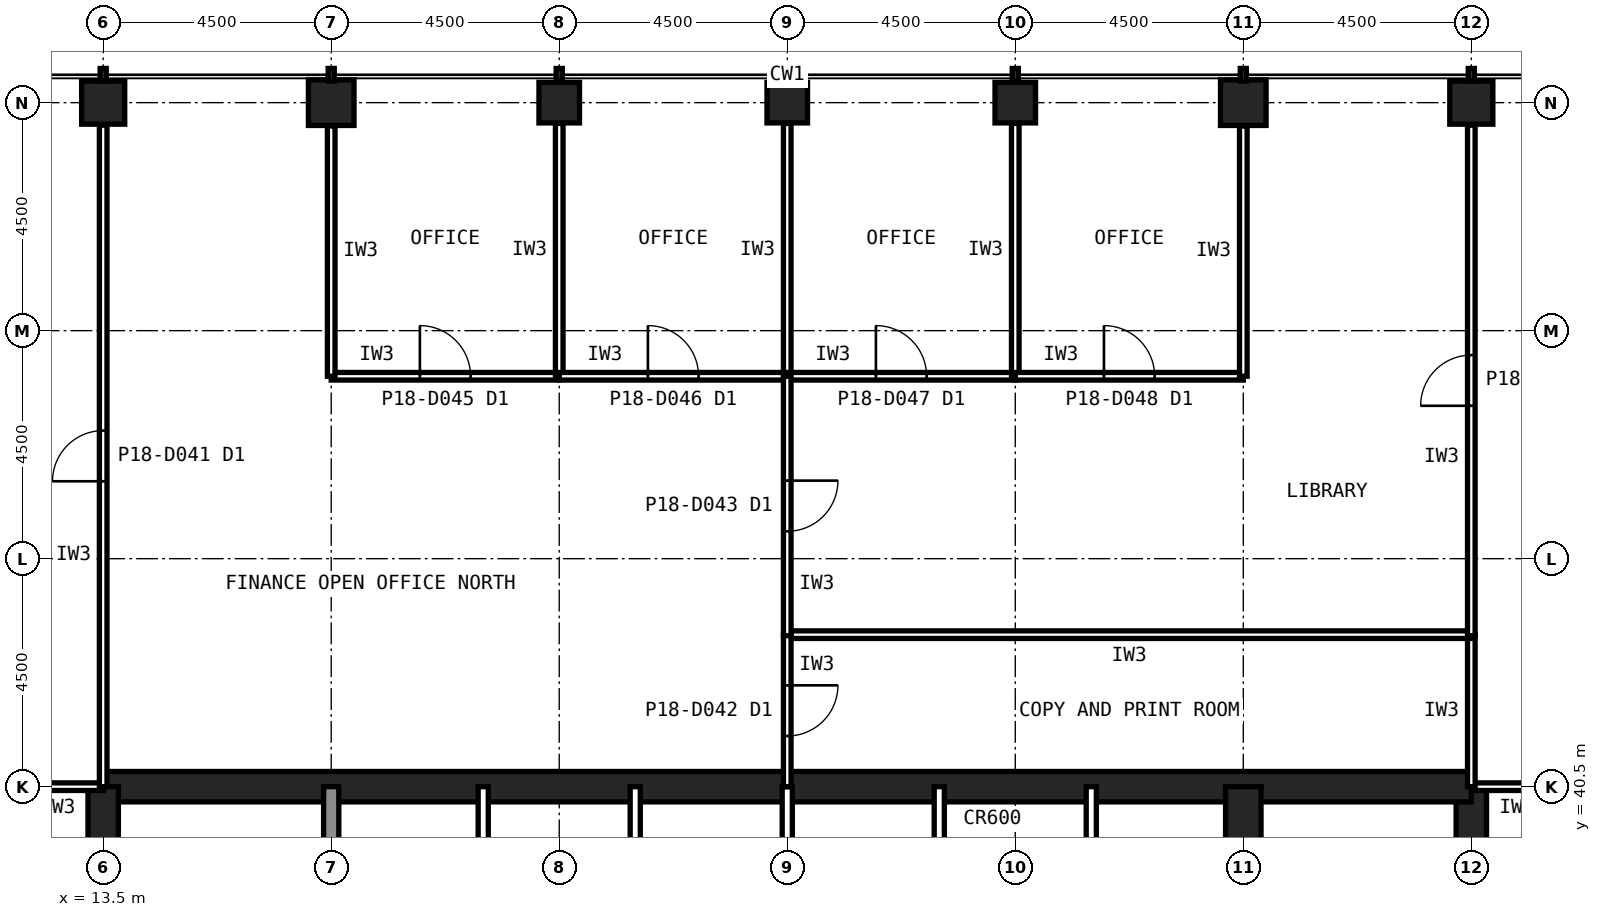
"""IFC4 building model, lengths in metres.
Left out: names, types, materials, properties, quantities, classifications, styles, units other than length and angle.
Written with IfcOpenShell. Run it as: python <this file> out.ifc"""

import sys

from ifc_helpers import new_model, si_unit, direction, frame, frame_2d, origin, origin_2d, place, context, subcontext, project, spatial, rectangle, hollow_rectangle, extrude, element, fill, save


model = new_model("IFC4")
c1 = context("Model", 3, precision=1e-05, world=origin(), true_north=direction((0.0, 1.0)))
c2 = subcontext(c1, "Body", "Model", "MODEL_VIEW")
j1 = project(units=[si_unit("LENGTHUNIT", "METRE"), si_unit("PLANEANGLEUNIT", "RADIAN")], contexts=[c1])
p1 = place(None, origin())
s1 = spatial("IfcSite", under=j1, at=p1, CompositionType="ELEMENT")
p2 = place(p1, origin())
s2 = spatial("IfcBuilding", under=s1, at=p2, CompositionType="ELEMENT")
p3 = place(p2, frame((0.0, 0.0, 79.4)))
s3 = spatial("IfcBuildingStorey", under=s2, at=p3, CompositionType="ELEMENT", Elevation=79.4)
p4 = place(p3, frame((40.5, 54.0, 0.0), z_axis=(0.0, 0.0, 1.0), x_axis=(1.0, 0.0, 0.0)))
e1 = element("IfcColumn", 1, at=p4, inside=s3, PredefinedType="COLUMN", context=c2, shape_type="SweptSolid", body=[
    extrude(hollow_rectangle(XDim=0.85, YDim=0.85, WallThickness=0.05, at=origin_2d()), origin(), (0.0, 0.0, 1.0), 4.2),
])
p5 = place(p3, frame((36.0, 54.0, 0.0), z_axis=(0.0, 0.0, 1.0), x_axis=(1.0, 0.0, 0.0)))
e2 = element("IfcColumn", 2, at=p5, inside=s3, PredefinedType="COLUMN", context=c2, shape_type="SweptSolid", body=[
    extrude(hollow_rectangle(XDim=0.9, YDim=0.9, WallThickness=0.063, at=origin_2d()), origin(), (0.0, 0.0, 1.0), 4.2),
])
for number, where, z_axis, x_axis in (
    (3, (31.5, 54.0, 0.0), (0.0, 0.0, 1.0), (1.0, 0.0, 0.0)),
    (4, (27.0, 54.0, 0.0), (0.0, 0.0, 1.0), (1.0, 0.0, 0.0)),
    (5, (22.5, 54.0, 0.0), (0.0, 0.0, 1.0), (1.0, 0.0, 0.0)),
):
    element("IfcColumn", number, at=place(p3, frame(where, z_axis=z_axis, x_axis=x_axis)), inside=s3, PredefinedType="COLUMN", context=c2, shape_type="SweptSolid", body=[
        extrude(hollow_rectangle(XDim=0.8, YDim=0.8, WallThickness=0.045, at=origin_2d()), origin(), (0.0, 0.0, 1.0), 4.2),
    ])
p6 = place(p3, frame((18.0, 54.0, 0.0), z_axis=(0.0, 0.0, 1.0), x_axis=(1.0, 0.0, 0.0)))
e6 = element("IfcColumn", 6, at=p6, inside=s3, PredefinedType="COLUMN", context=c2, shape_type="SweptSolid", body=[
    extrude(hollow_rectangle(XDim=0.9, YDim=0.9, WallThickness=0.063, at=origin_2d()), origin(), (0.0, 0.0, 1.0), 4.2),
])
p7 = place(p3, frame((13.5, 54.0, 0.0), z_axis=(0.0, 0.0, 1.0), x_axis=(1.0, 0.0, 0.0)))
e7 = element("IfcColumn", 7, at=p7, inside=s3, PredefinedType="COLUMN", context=c2, shape_type="SweptSolid", body=[
    extrude(hollow_rectangle(XDim=0.85, YDim=0.85, WallThickness=0.05, at=origin_2d()), origin(), (0.0, 0.0, 1.0), 4.2),
])
p8 = place(p3, frame((40.5, 13.5, 0.0), z_axis=(0.0, 0.0, 1.0), x_axis=(0.0, 1.0, 0.0)))
e8 = element("IfcWall", 8, at=p8, inside=s3, PredefinedType="SHEAR", context=c2, shape_type="SweptSolid", body=[
    extrude(rectangle(XDim=27.0, YDim=0.6, at=frame_2d((13.5, 0.0))), origin(), (0.0, 0.0, 1.0), 4.2),
])
p9 = place(p8, frame((5.85, 0.0, 0.0)))
e9 = element("IfcOpeningElement", 9, at=p9, cuts=e8, PredefinedType="OPENING", context=c2, shape_type="SweptSolid", body=[
    extrude(rectangle(XDim=1.8, YDim=2.1, at=frame_2d((0.9, 1.05))), frame((0.0, 0.31, 0.0), z_axis=(0.0, -1.0, 0.0), x_axis=(1.0, 0.0, 0.0)), (0.0, 0.0, 1.0), 0.62),
])
p10 = place(p8, frame((19.65, 0.0, 0.0)))
e10 = element("IfcOpeningElement", 10, at=p10, cuts=e8, PredefinedType="OPENING", context=c2, shape_type="SweptSolid", body=[
    extrude(rectangle(XDim=1.2, YDim=2.1, at=frame_2d((0.6, 1.05))), frame((0.0, 0.31, 0.0), z_axis=(0.0, -1.0, 0.0), x_axis=(1.0, 0.0, 0.0)), (0.0, 0.0, 1.0), 0.62),
])
p11 = place(p3, frame((40.5, 40.5, 0.0), z_axis=(0.0, 0.0, 1.0), x_axis=(-1.0, 0.0, 0.0)))
e11 = element("IfcWall", 11, at=p11, inside=s3, PredefinedType="SHEAR", context=c2, shape_type="SweptSolid", body=[
    extrude(rectangle(XDim=27.0, YDim=0.6, at=frame_2d((13.5, 0.0))), origin(), (0.0, 0.0, 1.0), 4.2),
])
p12 = place(p3, frame((13.5, 40.5, 0.0), z_axis=(0.0, 0.0, 1.0), x_axis=(0.0, -1.0, 0.0)))
e12 = element("IfcWall", 12, at=p12, inside=s3, PredefinedType="SHEAR", context=c2, shape_type="SweptSolid", body=[
    extrude(rectangle(XDim=27.0, YDim=0.6, at=frame_2d((13.5, 0.0))), origin(), (0.0, 0.0, 1.0), 4.2),
])
p13 = place(p12, frame((19.65, 0.0, 0.0)))
e13 = element("IfcOpeningElement", 13, at=p13, cuts=e12, PredefinedType="OPENING", context=c2, shape_type="SweptSolid", body=[
    extrude(rectangle(XDim=1.2, YDim=2.1, at=frame_2d((0.6, 1.05))), frame((0.0, 0.31, 0.0), z_axis=(0.0, -1.0, 0.0), x_axis=(1.0, 0.0, 0.0)), (0.0, 0.0, 1.0), 0.62),
])
p14 = place(p12, frame((5.85, 0.0, 0.0)))
e14 = element("IfcOpeningElement", 14, at=p14, cuts=e12, PredefinedType="OPENING", context=c2, shape_type="SweptSolid", body=[
    extrude(rectangle(XDim=1.8, YDim=2.1, at=frame_2d((0.9, 1.05))), frame((0.0, 0.31, 0.0), z_axis=(0.0, -1.0, 0.0), x_axis=(1.0, 0.0, 0.0)), (0.0, 0.0, 1.0), 0.62),
])
p15 = place(p3, frame((18.0, 36.0, 0.0), z_axis=(0.0, 0.0, 1.0), x_axis=(0.0, 1.0, 0.0)))
e15 = element("IfcWall", 15, at=p15, inside=s3, PredefinedType="SOLIDWALL", context=c2, shape_type="SweptSolid", body=[
    extrude(rectangle(XDim=4.5, YDim=0.3, at=frame_2d((2.25, 0.0))), origin(), (0.0, 0.0, 1.0), 4.04),
])
p16 = place(p3, frame((36.0, 22.5, 0.0), z_axis=(0.0, 0.0, 1.0), x_axis=(0.0, 1.0, 0.0)))
e16 = element("IfcWall", 16, at=p16, inside=s3, PredefinedType="SHEAR", context=c2, shape_type="SweptSolid", body=[
    extrude(rectangle(XDim=18.0, YDim=0.7, at=frame_2d((9.0, 0.0))), origin(), (0.0, 0.0, 1.0), 4.2),
])
for number, where, z_axis, x_axis in (
    (17, (21.0, 36.0, 0.0), (0.0, 0.0, 1.0), (0.0, 1.0, 0.0)),
    (18, (24.0, 36.0, 0.0), (0.0, 0.0, 1.0), (0.0, 1.0, 0.0)),
    (19, (27.0, 36.0, 0.0), (0.0, 0.0, 1.0), (0.0, 1.0, 0.0)),
    (20, (30.0, 36.0, 0.0), (0.0, 0.0, 1.0), (0.0, 1.0, 0.0)),
    (21, (33.0, 36.0, 0.0), (0.0, 0.0, 1.0), (0.0, 1.0, 0.0)),
):
    element("IfcWall", number, at=place(p3, frame(where, z_axis=z_axis, x_axis=x_axis)), inside=s3, PredefinedType="PARTITIONING", context=c2, shape_type="SweptSolid", body=[
        extrude(rectangle(XDim=4.5, YDim=0.2, at=frame_2d((2.25, 0.0))), origin(), (0.0, 0.0, 1.0), 4.04),
    ])
p17 = place(p3, frame((13.51, 40.5, 0.0), z_axis=(0.0, 0.0, 1.0), x_axis=(-1.0, 0.0, 0.0)))
e22 = element("IfcWall", 22, at=p17, inside=s3, PredefinedType="PARTITIONING", context=c2, shape_type="SweptSolid", body=[
    extrude(rectangle(XDim=1.81, YDim=0.15, at=frame_2d((0.905, 0.0))), origin(), (0.0, 0.0, 1.0), 3.189),
])
p18 = place(p3, frame((42.3, 40.5, 0.0), z_axis=(0.0, 0.0, 1.0), x_axis=(-1.0, 0.0, 0.0)))
e23 = element("IfcWall", 23, at=p18, inside=s3, PredefinedType="PARTITIONING", context=c2, shape_type="SweptSolid", body=[
    extrude(rectangle(XDim=1.8, YDim=0.15, at=frame_2d((0.9, 0.0))), origin(), (0.0, 0.0, 1.0), 3.189),
])
p19 = place(p3, frame((18.0, 48.6, 0.0), z_axis=(0.0, 0.0, 1.0), x_axis=(1.0, 0.0, 0.0)))
e24 = element("IfcWall", 24, at=p19, inside=s3, PredefinedType="PARTITIONING", context=c2, shape_type="SweptSolid", body=[
    extrude(rectangle(XDim=4.5, YDim=0.15, at=frame_2d((2.25, 0.0))), origin(), (0.0, 0.0, 1.0), 4.04),
])
p20 = place(p19, frame((1.75, 0.0, 0.0)))
e25 = element("IfcOpeningElement", 25, at=p20, cuts=e24, PredefinedType="OPENING", context=c2, shape_type="SweptSolid", body=[
    extrude(rectangle(XDim=1.0, YDim=2.1, at=frame_2d((0.5, 1.05))), frame((0.0, 0.085, 0.0), z_axis=(0.0, -1.0, 0.0), x_axis=(1.0, 0.0, 0.0)), (0.0, 0.0, 1.0), 0.17),
])
p21 = place(p3, frame((22.5, 48.6, 0.0), z_axis=(0.0, 0.0, 1.0), x_axis=(0.0, 1.0, 0.0)))
e26 = element("IfcWall", 26, at=p21, inside=s3, PredefinedType="PARTITIONING", context=c2, shape_type="SweptSolid", body=[
    extrude(rectangle(XDim=4.99, YDim=0.15, at=frame_2d((2.495, 0.0))), origin(), (0.0, 0.0, 1.0), 3.189),
])
p22 = place(p3, frame((18.0, 53.54, 0.0), z_axis=(0.0, 0.0, 1.0), x_axis=(0.0, -1.0, 0.0)))
e27 = element("IfcWall", 27, at=p22, inside=s3, PredefinedType="PARTITIONING", context=c2, shape_type="SweptSolid", body=[
    extrude(rectangle(XDim=4.94, YDim=0.15, at=frame_2d((2.47, 0.0))), origin(), (0.0, 0.0, 1.0), 3.189),
])
p23 = place(p3, frame((22.5, 48.6, 0.0), z_axis=(0.0, 0.0, 1.0), x_axis=(1.0, 0.0, 0.0)))
e28 = element("IfcWall", 28, at=p23, inside=s3, PredefinedType="PARTITIONING", context=c2, shape_type="SweptSolid", body=[
    extrude(rectangle(XDim=4.5, YDim=0.15, at=frame_2d((2.25, 0.0))), origin(), (0.0, 0.0, 1.0), 4.04),
])
p24 = place(p23, frame((1.75, 0.0, 0.0)))
e29 = element("IfcOpeningElement", 29, at=p24, cuts=e28, PredefinedType="OPENING", context=c2, shape_type="SweptSolid", body=[
    extrude(rectangle(XDim=1.0, YDim=2.1, at=frame_2d((0.5, 1.05))), frame((0.0, 0.085, 0.0), z_axis=(0.0, -1.0, 0.0), x_axis=(1.0, 0.0, 0.0)), (0.0, 0.0, 1.0), 0.17),
])
p25 = place(p3, frame((27.0, 48.6, 0.0), z_axis=(0.0, 0.0, 1.0), x_axis=(0.0, 1.0, 0.0)))
e30 = element("IfcWall", 30, at=p25, inside=s3, PredefinedType="PARTITIONING", context=c2, shape_type="SweptSolid", body=[
    extrude(rectangle(XDim=4.99, YDim=0.15, at=frame_2d((2.495, 0.0))), origin(), (0.0, 0.0, 1.0), 3.189),
])
p26 = place(p3, frame((27.0, 48.6, 0.0), z_axis=(0.0, 0.0, 1.0), x_axis=(1.0, 0.0, 0.0)))
e31 = element("IfcWall", 31, at=p26, inside=s3, PredefinedType="PARTITIONING", context=c2, shape_type="SweptSolid", body=[
    extrude(rectangle(XDim=4.5, YDim=0.15, at=frame_2d((2.25, 0.0))), origin(), (0.0, 0.0, 1.0), 4.04),
])
p27 = place(p26, frame((1.75, 0.0, 0.0)))
e32 = element("IfcOpeningElement", 32, at=p27, cuts=e31, PredefinedType="OPENING", context=c2, shape_type="SweptSolid", body=[
    extrude(rectangle(XDim=1.0, YDim=2.1, at=frame_2d((0.5, 1.05))), frame((0.0, 0.085, 0.0), z_axis=(0.0, -1.0, 0.0), x_axis=(1.0, 0.0, 0.0)), (0.0, 0.0, 1.0), 0.17),
])
p28 = place(p3, frame((31.5, 48.6, 0.0), z_axis=(0.0, 0.0, 1.0), x_axis=(0.0, 1.0, 0.0)))
e33 = element("IfcWall", 33, at=p28, inside=s3, PredefinedType="PARTITIONING", context=c2, shape_type="SweptSolid", body=[
    extrude(rectangle(XDim=4.99, YDim=0.15, at=frame_2d((2.495, 0.0))), origin(), (0.0, 0.0, 1.0), 3.189),
])
p29 = place(p3, frame((31.5, 48.6, 0.0), z_axis=(0.0, 0.0, 1.0), x_axis=(1.0, 0.0, 0.0)))
e34 = element("IfcWall", 34, at=p29, inside=s3, PredefinedType="PARTITIONING", context=c2, shape_type="SweptSolid", body=[
    extrude(rectangle(XDim=4.5, YDim=0.15, at=frame_2d((2.25, 0.0))), origin(), (0.0, 0.0, 1.0), 4.04),
])
p30 = place(p29, frame((1.75, 0.0, 0.0)))
e35 = element("IfcOpeningElement", 35, at=p30, cuts=e34, PredefinedType="OPENING", context=c2, shape_type="SweptSolid", body=[
    extrude(rectangle(XDim=1.0, YDim=2.1, at=frame_2d((0.5, 1.05))), frame((0.0, 0.085, 0.0), z_axis=(0.0, -1.0, 0.0), x_axis=(1.0, 0.0, 0.0)), (0.0, 0.0, 1.0), 0.17),
])
p31 = place(p3, frame((36.0, 48.6, 0.0), z_axis=(0.0, 0.0, 1.0), x_axis=(0.0, 1.0, 0.0)))
e36 = element("IfcWall", 36, at=p31, inside=s3, PredefinedType="PARTITIONING", context=c2, shape_type="SweptSolid", body=[
    extrude(rectangle(XDim=4.94, YDim=0.15, at=frame_2d((2.47, 0.0))), origin(), (0.0, 0.0, 1.0), 3.189),
])
p32 = place(p3, frame((40.5, 40.5, 0.0), z_axis=(0.0, 0.0, 1.0), x_axis=(0.0, 1.0, 0.0)))
e37 = element("IfcWall", 37, at=p32, inside=s3, PredefinedType="PARTITIONING", context=c2, shape_type="SweptSolid", body=[
    extrude(rectangle(XDim=3.0, YDim=0.15, at=frame_2d((1.5, 0.0))), origin(), (0.0, 0.0, 1.0), 3.189),
])
p33 = place(p3, frame((40.5, 43.5, 0.0), z_axis=(0.0, 0.0, 1.0), x_axis=(-1.0, 0.0, 0.0)))
e38 = element("IfcWall", 38, at=p33, inside=s3, PredefinedType="PARTITIONING", context=c2, shape_type="SweptSolid", body=[
    extrude(rectangle(XDim=13.5, YDim=0.15, at=frame_2d((6.75, 0.0))), origin(), (0.0, 0.0, 1.0), 4.04),
])
p34 = place(p3, frame((27.0, 43.5, 0.0), z_axis=(0.0, 0.0, 1.0), x_axis=(0.0, -1.0, 0.0)))
e39 = element("IfcWall", 39, at=p34, inside=s3, PredefinedType="PARTITIONING", context=c2, shape_type="SweptSolid", body=[
    extrude(rectangle(XDim=3.0, YDim=0.15, at=frame_2d((1.5, 0.0))), origin(), (0.0, 0.0, 1.0), 3.189),
])
p35 = place(p34, frame((1.0, 0.0, 0.0)))
e40 = element("IfcOpeningElement", 40, at=p35, cuts=e39, PredefinedType="OPENING", context=c2, shape_type="SweptSolid", body=[
    extrude(rectangle(XDim=1.0, YDim=2.1, at=frame_2d((0.5, 1.05))), frame((0.0, 0.085, 0.0), z_axis=(0.0, -1.0, 0.0), x_axis=(1.0, 0.0, 0.0)), (0.0, 0.0, 1.0), 0.17),
])
p36 = place(p3, frame((13.5, 40.5, 0.0), z_axis=(0.0, 0.0, 1.0), x_axis=(0.0, 1.0, 0.0)))
e41 = element("IfcWall", 41, at=p36, inside=s3, PredefinedType="PARTITIONING", context=c2, shape_type="SweptSolid", body=[
    extrude(rectangle(XDim=13.055, YDim=0.15, at=frame_2d((6.527, 0.0))), origin(), (0.0, 0.0, 1.0), 3.189),
])
p37 = place(p36, frame((6.028, 0.0, 0.0)))
e42 = element("IfcOpeningElement", 42, at=p37, cuts=e41, PredefinedType="OPENING", context=c2, shape_type="SweptSolid", body=[
    extrude(rectangle(XDim=1.0, YDim=2.1, at=frame_2d((0.5, 1.05))), frame((0.0, 0.085, 0.0), z_axis=(0.0, -1.0, 0.0), x_axis=(1.0, 0.0, 0.0)), (0.0, 0.0, 1.0), 0.17),
])
p38 = place(p3, frame((27.0, 48.6, 0.0), z_axis=(0.0, 0.0, 1.0), x_axis=(0.0, -1.0, 0.0)))
e43 = element("IfcWall", 43, at=p38, inside=s3, PredefinedType="PARTITIONING", context=c2, shape_type="SweptSolid", body=[
    extrude(rectangle(XDim=5.12, YDim=0.15, at=frame_2d((2.56, 0.0))), origin(), (0.0, 0.0, 1.0), 3.189),
])
p39 = place(p38, frame((2.06, 0.0, 0.0)))
e44 = element("IfcOpeningElement", 44, at=p39, cuts=e43, PredefinedType="OPENING", context=c2, shape_type="SweptSolid", body=[
    extrude(rectangle(XDim=1.0, YDim=2.1, at=frame_2d((0.5, 1.05))), frame((0.0, 0.085, 0.0), z_axis=(0.0, -1.0, 0.0), x_axis=(1.0, 0.0, 0.0)), (0.0, 0.0, 1.0), 0.17),
])
p40 = place(p3, frame((40.5, 43.48, 0.0), z_axis=(0.0, 0.0, 1.0), x_axis=(0.0, 1.0, 0.0)))
e45 = element("IfcWall", 45, at=p40, inside=s3, PredefinedType="PARTITIONING", context=c2, shape_type="SweptSolid", body=[
    extrude(rectangle(XDim=10.075, YDim=0.15, at=frame_2d((5.038, 0.0))), origin(), (0.0, 0.0, 1.0), 3.189),
])
p41 = place(p40, frame((4.538, 0.0, 0.0)))
e46 = element("IfcOpeningElement", 46, at=p41, cuts=e45, PredefinedType="OPENING", context=c2, shape_type="SweptSolid", body=[
    extrude(rectangle(XDim=1.0, YDim=2.1, at=frame_2d((0.5, 1.05))), frame((0.0, 0.085, 0.0), z_axis=(0.0, -1.0, 0.0), x_axis=(1.0, 0.0, 0.0)), (0.0, 0.0, 1.0), 0.17),
])
p42 = place(p20, origin())
e47 = element("IfcDoor", 47, at=p42, inside=s3, OperationType="SINGLE_SWING_LEFT", PredefinedType="DOOR", context=c2, shape_type="SweptSolid", body=[
    extrude(rectangle(XDim=1.0, YDim=2.1, at=frame_2d((0.5, 1.05))), frame((0.0, 0.025, 0.0), z_axis=(0.0, -1.0, 0.0), x_axis=(1.0, 0.0, 0.0)), (0.0, 0.0, 1.0), 0.05),
])
fill(e25, e47)
p43 = place(p24, origin())
e48 = element("IfcDoor", 48, at=p43, inside=s3, OperationType="SINGLE_SWING_LEFT", PredefinedType="DOOR", context=c2, shape_type="SweptSolid", body=[
    extrude(rectangle(XDim=1.0, YDim=2.1, at=frame_2d((0.5, 1.05))), frame((0.0, 0.025, 0.0), z_axis=(0.0, -1.0, 0.0), x_axis=(1.0, 0.0, 0.0)), (0.0, 0.0, 1.0), 0.05),
])
fill(e29, e48)
p44 = place(p27, origin())
e49 = element("IfcDoor", 49, at=p44, inside=s3, OperationType="SINGLE_SWING_LEFT", PredefinedType="DOOR", context=c2, shape_type="SweptSolid", body=[
    extrude(rectangle(XDim=1.0, YDim=2.1, at=frame_2d((0.5, 1.05))), frame((0.0, 0.025, 0.0), z_axis=(0.0, -1.0, 0.0), x_axis=(1.0, 0.0, 0.0)), (0.0, 0.0, 1.0), 0.05),
])
fill(e32, e49)
p45 = place(p30, origin())
e50 = element("IfcDoor", 50, at=p45, inside=s3, OperationType="SINGLE_SWING_LEFT", PredefinedType="DOOR", context=c2, shape_type="SweptSolid", body=[
    extrude(rectangle(XDim=1.0, YDim=2.1, at=frame_2d((0.5, 1.05))), frame((0.0, 0.025, 0.0), z_axis=(0.0, -1.0, 0.0), x_axis=(1.0, 0.0, 0.0)), (0.0, 0.0, 1.0), 0.05),
])
fill(e35, e50)
p46 = place(p35, origin())
e51 = element("IfcDoor", 51, at=p46, inside=s3, OperationType="SINGLE_SWING_LEFT", PredefinedType="DOOR", context=c2, shape_type="SweptSolid", body=[
    extrude(rectangle(XDim=1.0, YDim=2.1, at=frame_2d((0.5, 1.05))), frame((0.0, 0.025, 0.0), z_axis=(0.0, -1.0, 0.0), x_axis=(1.0, 0.0, 0.0)), (0.0, 0.0, 1.0), 0.05),
])
fill(e40, e51)
p47 = place(p37, origin())
e52 = element("IfcDoor", 52, at=p47, inside=s3, OperationType="SINGLE_SWING_LEFT", PredefinedType="DOOR", context=c2, shape_type="SweptSolid", body=[
    extrude(rectangle(XDim=1.0, YDim=2.1, at=frame_2d((0.5, 1.05))), frame((0.0, 0.025, 0.0), z_axis=(0.0, -1.0, 0.0), x_axis=(1.0, 0.0, 0.0)), (0.0, 0.0, 1.0), 0.05),
])
fill(e42, e52)
p48 = place(p39, origin())
e53 = element("IfcDoor", 53, at=p48, inside=s3, OperationType="SINGLE_SWING_LEFT", PredefinedType="DOOR", context=c2, shape_type="SweptSolid", body=[
    extrude(rectangle(XDim=1.0, YDim=2.1, at=frame_2d((0.5, 1.05))), frame((0.0, 0.025, 0.0), z_axis=(0.0, -1.0, 0.0), x_axis=(1.0, 0.0, 0.0)), (0.0, 0.0, 1.0), 0.05),
])
fill(e44, e53)
p49 = place(p41, origin())
e54 = element("IfcDoor", 54, at=p49, inside=s3, OperationType="SINGLE_SWING_LEFT", PredefinedType="DOOR", context=c2, shape_type="SweptSolid", body=[
    extrude(rectangle(XDim=1.0, YDim=2.1, at=frame_2d((0.5, 1.05))), frame((0.0, 0.025, 0.0), z_axis=(0.0, -1.0, 0.0), x_axis=(1.0, 0.0, 0.0)), (0.0, 0.0, 1.0), 0.05),
])
fill(e46, e54)
save(model, sys.argv[1])
